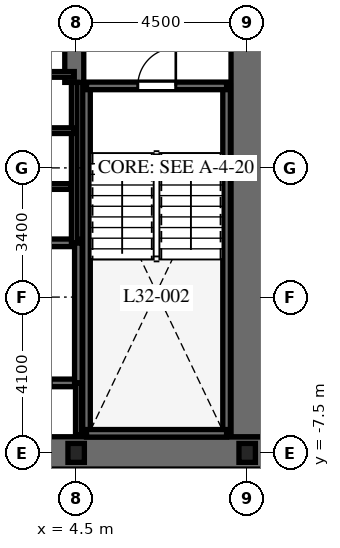
"""IFC4 building model, lengths in metres.
Left out: names, types, materials, properties, quantities, classifications, styles, units other than length and angle.
Written with IfcOpenShell. Run it as: python <this file> out.ifc"""

import sys

from ifc_helpers import new_model, si_unit, direction, frame, frame_2d, origin, origin_2d, place, context, subcontext, project, spatial, rectangle, i_section, extrude, element, fill, save


model = new_model("IFC4")
c1 = context("Model", 3, precision=1e-05, world=origin(), true_north=direction((0.0, 1.0)))
c2 = subcontext(c1, "Body", "Model", "MODEL_VIEW")
j1 = project(units=[si_unit("LENGTHUNIT", "METRE"), si_unit("PLANEANGLEUNIT", "RADIAN")], contexts=[c1])
p1 = place(None, origin())
s1 = spatial("IfcSite", under=j1, at=p1, CompositionType="ELEMENT")
p2 = place(p1, origin())
s2 = spatial("IfcBuilding", under=s1, at=p2, CompositionType="ELEMENT")
p3 = place(p2, frame((0.0, 0.0, 132.1)))
s3 = spatial("IfcBuildingStorey", under=s2, at=p3, CompositionType="ELEMENT", Elevation=132.1)
p4 = place(p3, frame((-9.425, -7.5, 0.0), z_axis=(0.0, 0.0, 1.0), x_axis=(1.0, 0.0, 0.0)))
e1 = element("IfcWall", 1, at=p4, inside=s3, PredefinedType="SHEAR", context=c2, shape_type="SweptSolid", body=[
    extrude(rectangle(XDim=18.85, YDim=0.85, at=frame_2d((9.425, 0.0))), origin(), (0.0, 0.0, 1.0), 3.7),
])
p5 = place(p4, frame((9.475, 0.0, 0.0)))
e2 = element("IfcOpeningElement", 2, at=p5, cuts=e1, PredefinedType="OPENING", context=c2, shape_type="SweptSolid", body=[
    extrude(rectangle(XDim=1.0, YDim=2.15, at=frame_2d((0.5, 1.075))), frame((0.0, 0.435, 0.0), z_axis=(0.0, -1.0, 0.0), x_axis=(1.0, 0.0, 0.0)), (0.0, 0.0, 1.0), 0.87),
])
p6 = place(p3, frame((9.0, -7.075, 0.0), z_axis=(0.0, 0.0, 1.0), x_axis=(0.0, 1.0, 0.0)))
e3 = element("IfcWall", 3, at=p6, inside=s3, PredefinedType="SHEAR", context=c2, shape_type="SweptSolid", body=[
    extrude(rectangle(XDim=14.15, YDim=0.85, at=frame_2d((7.075, 0.0))), origin(), (0.0, 0.0, 1.0), 3.7),
])
p7 = place(p6, frame((10.2, 0.0, 0.0)))
e4 = element("IfcOpeningElement", 4, at=p7, cuts=e3, PredefinedType="OPENING", context=c2, shape_type="SweptSolid", body=[
    extrude(rectangle(XDim=1.05, YDim=2.15, at=frame_2d((0.525, 1.075))), frame((0.0, 0.435, 0.0), z_axis=(0.0, -1.0, 0.0), x_axis=(1.0, 0.0, 0.0)), (0.0, 0.0, 1.0), 0.87),
])
p8 = place(p3, frame((4.45, 2.25, 0.0), z_axis=(0.0, 0.0, 1.0), x_axis=(0.0, 1.0, 0.0)))
e5 = element("IfcWall", 5, at=p8, inside=s3, PredefinedType="SHEAR", context=c2, shape_type="SweptSolid", body=[
    extrude(rectangle(XDim=4.825, YDim=0.5, at=frame_2d((2.413, 0.0))), origin(), (0.0, 0.0, 1.0), 3.7),
])
for number, where, z_axis, x_axis in (
    (6, (4.772, -6.985, 0.0), (0.0, 0.0, 1.0), (0.0, 1.0, 0.0)),
    (7, (8.458, -6.985, 0.0), (0.0, 0.0, 1.0), (0.0, 1.0, 0.0)),
):
    element("IfcWall", number, at=place(p3, frame(where, z_axis=z_axis, x_axis=x_axis)), inside=s3, PredefinedType="SHEAR", context=c2, shape_type="SweptSolid", body=[
        extrude(rectangle(XDim=9.143, YDim=0.2, at=frame_2d((4.572, 0.0))), origin(), (0.0, 0.0, 1.0), 3.7),
    ])
p9 = place(p3, frame((4.772, -6.985, 0.0), z_axis=(0.0, 0.0, 1.0), x_axis=(1.0, 0.0, 0.0)))
e8 = element("IfcWall", 8, at=p9, inside=s3, PredefinedType="SHEAR", context=c2, shape_type="SweptSolid", body=[
    extrude(rectangle(XDim=3.686, YDim=0.2, at=frame_2d((1.843, 0.0))), origin(), (0.0, 0.0, 1.0), 3.7),
])
p10 = place(p3, frame((4.772, 2.158, 0.0), z_axis=(0.0, 0.0, 1.0), x_axis=(1.0, 0.0, 0.0)))
e9 = element("IfcWall", 9, at=p10, inside=s3, PredefinedType="SHEAR", context=c2, shape_type="SweptSolid", body=[
    extrude(rectangle(XDim=3.686, YDim=0.2, at=frame_2d((1.843, 0.0))), origin(), (0.0, 0.0, 1.0), 3.7),
])
p11 = place(p10, frame((1.35, 0.0, 0.0)))
e10 = element("IfcOpeningElement", 10, at=p11, cuts=e9, PredefinedType="OPENING", context=c2, shape_type="SweptSolid", body=[
    extrude(rectangle(XDim=1.0, YDim=2.15, at=frame_2d((0.5, 1.075))), frame((0.0, 0.11, 0.0), z_axis=(0.0, -1.0, 0.0), x_axis=(1.0, 0.0, 0.0)), (0.0, 0.0, 1.0), 0.22),
])
p12 = place(p3, frame((-4.608, -5.658, 0.0), z_axis=(0.0, 0.0, 1.0), x_axis=(1.0, 0.0, 0.0)))
e11 = element("IfcWall", 11, at=p12, inside=s3, PredefinedType="SHEAR", context=c2, shape_type="SweptSolid", body=[
    extrude(rectangle(XDim=9.166, YDim=0.2, at=frame_2d((4.583, 0.0))), origin(), (0.0, 0.0, 1.0), 3.7),
])
p13 = place(p12, frame((7.45, 0.0, 0.0)))
e12 = element("IfcOpeningElement", 12, at=p13, cuts=e11, PredefinedType="OPENING", context=c2, shape_type="SweptSolid", body=[
    extrude(rectangle(XDim=1.0, YDim=2.15, at=frame_2d((0.5, 1.075))), frame((0.0, 0.11, 0.0), z_axis=(0.0, -1.0, 0.0), x_axis=(1.0, 0.0, 0.0)), (0.0, 0.0, 1.0), 0.22),
])
p14 = place(p3, frame((-4.608, -1.972, 0.0), z_axis=(0.0, 0.0, 1.0), x_axis=(1.0, 0.0, 0.0)))
e13 = element("IfcWall", 13, at=p14, inside=s3, PredefinedType="SHEAR", context=c2, shape_type="SweptSolid", body=[
    extrude(rectangle(XDim=9.166, YDim=0.2, at=frame_2d((4.583, 0.0))), origin(), (0.0, 0.0, 1.0), 3.7),
])
p15 = place(p3, frame((4.558, -5.658, 0.0), z_axis=(0.0, 0.0, 1.0), x_axis=(0.0, 1.0, 0.0)))
e14 = element("IfcWall", 14, at=p15, inside=s3, PredefinedType="SHEAR", context=c2, shape_type="SweptSolid", body=[
    extrude(rectangle(XDim=3.686, YDim=0.2, at=frame_2d((1.843, 0.0))), origin(), (0.0, 0.0, 1.0), 3.7),
])
for number, where, z_axis, x_axis in (
    (15, (4.5, -7.5, 0.0), (0.0, 0.0, 1.0), (1.0, 0.0, 0.0)),
    (16, (9.0, -7.5, 0.0), (0.0, 0.0, 1.0), (1.0, 0.0, 0.0)),
):
    element("IfcColumn", number, at=place(p3, frame(where, z_axis=z_axis, x_axis=x_axis)), inside=s3, PredefinedType="COLUMN", context=c2, shape_type="SweptSolid", body=[
        extrude(i_section(OverallWidth=0.432, OverallDepth=0.498, WebThickness=0.056, FlangeThickness=0.089, at=origin_2d()), origin(), (0.0, 0.0, 1.0), 3.7),
    ])
p16 = place(p3, frame((4.558, -7.02, 0.0), z_axis=(0.0, 0.0, 1.0), x_axis=(0.0, 1.0, 0.0)))
e17 = element("IfcWall", 17, at=p16, inside=s3, PredefinedType="PARTITIONING", context=c2, shape_type="SweptSolid", body=[
    extrude(rectangle(XDim=1.362, YDim=0.15, at=frame_2d((0.681, 0.0))), origin(), (0.0, 0.0, 1.0), 3.4),
])
p17 = place(p3, frame((4.45, -1.972, 0.0), z_axis=(0.0, 0.0, 1.0), x_axis=(0.0, 1.0, 0.0)))
e18 = element("IfcWall", 18, at=p17, inside=s3, PredefinedType="PARTITIONING", context=c2, shape_type="SweptSolid", body=[
    extrude(rectangle(XDim=4.222, YDim=0.15, at=frame_2d((2.111, 0.0))), origin(), (0.0, 0.0, 1.0), 3.4),
])
for number, where, z_axis, x_axis in (
    (19, (1.9, 0.98, 0.0), (0.0, 0.0, 1.0), (1.0, 0.0, 0.0)),
    (20, (1.9, 2.46, 0.0), (0.0, 0.0, 1.0), (1.0, 0.0, 0.0)),
):
    element("IfcWall", number, at=place(p3, frame(where, z_axis=z_axis, x_axis=x_axis)), inside=s3, PredefinedType="PARTITIONING", context=c2, shape_type="SweptSolid", body=[
        extrude(rectangle(XDim=2.55, YDim=0.15, at=frame_2d((1.275, 0.0))), origin(), (0.0, 0.0, 1.0), 3.4),
    ])
p18 = place(p3, frame((-4.36, -0.49, 0.0), z_axis=(0.0, 0.0, 1.0), x_axis=(1.0, 0.0, 0.0)))
e21 = element("IfcWall", 21, at=p18, inside=s3, PredefinedType="PARTITIONING", context=c2, shape_type="SweptSolid", body=[
    extrude(rectangle(XDim=8.72, YDim=0.15, at=frame_2d((4.36, 0.0))), origin(), (0.0, 0.0, 1.0), 3.4),
])
p19 = place(p18, frame((3.86, 0.0, 0.0)))
e22 = element("IfcOpeningElement", 22, at=p19, cuts=e21, PredefinedType="OPENING", context=c2, shape_type="SweptSolid", body=[
    extrude(rectangle(XDim=0.9, YDim=2.03, at=frame_2d((0.45, 1.015))), frame((0.0, 0.085, 0.0), z_axis=(0.0, -1.0, 0.0), x_axis=(1.0, 0.0, 0.0)), (0.0, 0.0, 1.0), 0.17),
])
p20 = place(p11, origin())
e23 = element("IfcDoor", 23, at=p20, inside=s3, OperationType="SINGLE_SWING_RIGHT", PredefinedType="DOOR", context=c2, shape_type="SweptSolid", body=[
    extrude(rectangle(XDim=1.0, YDim=2.15, at=frame_2d((0.5, 1.075))), frame((0.0, 0.025, 0.0), z_axis=(0.0, -1.0, 0.0), x_axis=(1.0, 0.0, 0.0)), (0.0, 0.0, 1.0), 0.05),
])
fill(e10, e23)
save(model, sys.argv[1])
